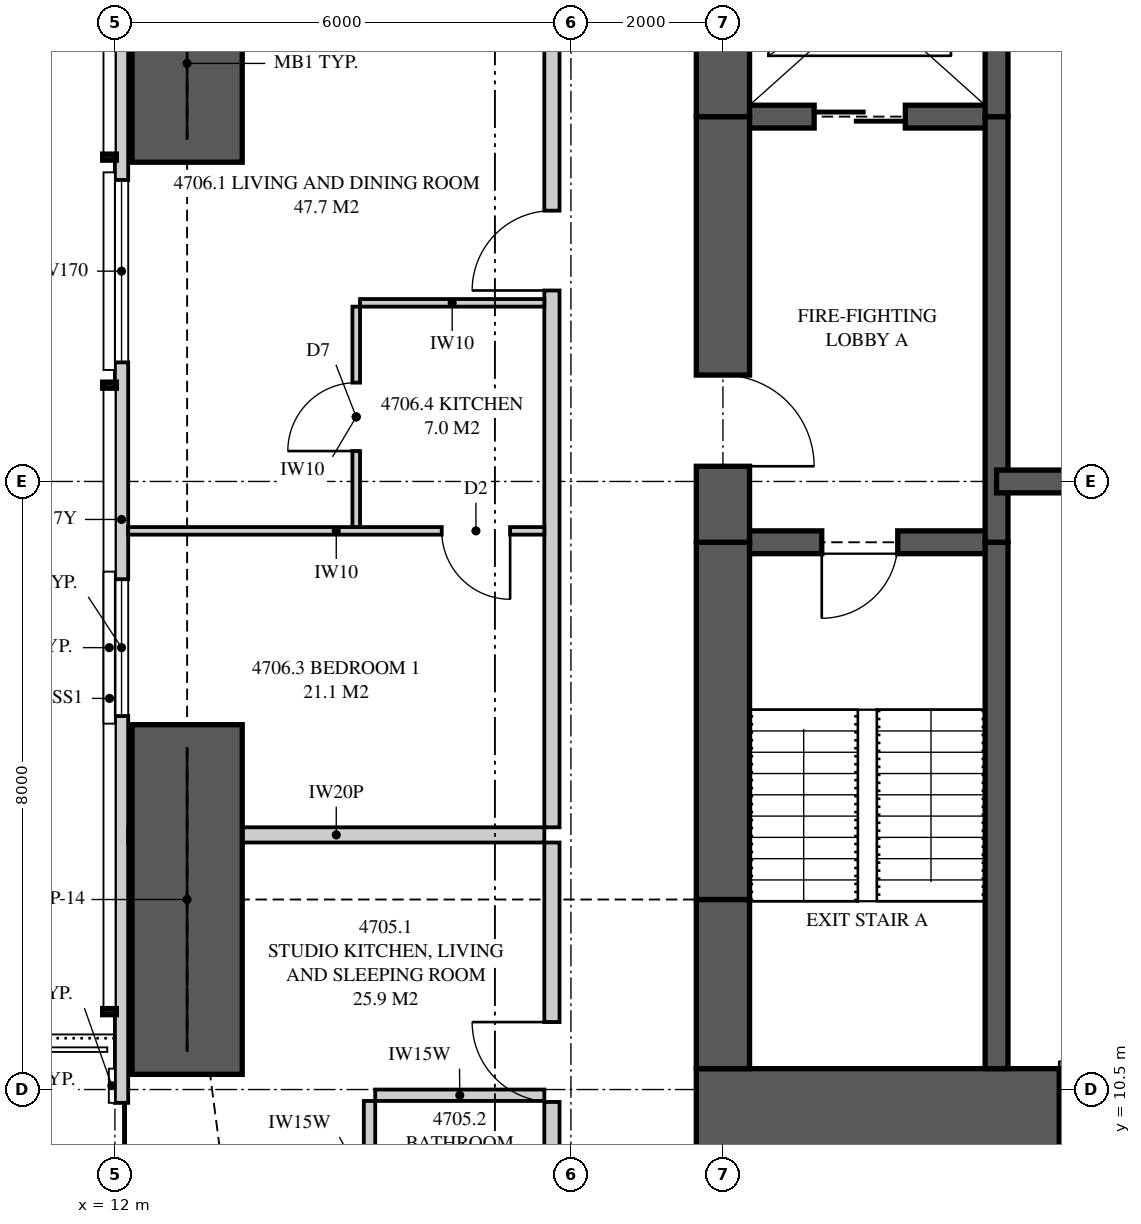
"""IFC4 building model, lengths in metres.
Left out: names, types, materials, properties, quantities, classifications, styles, units other than length and angle.
Written with IfcOpenShell. Run it as: python <this file> out.ifc"""

import sys

from ifc_helpers import new_model, si_unit, direction, frame, frame_2d, origin, place, context, subcontext, project, spatial, polyline, rectangle, outline, extrude, element, fill, save


model = new_model("IFC4")
c1 = context("Model", 3, precision=1e-05, world=origin(), true_north=direction((0.0, 1.0)))
c2 = subcontext(c1, "Body", "Model", "MODEL_VIEW")
j1 = project(units=[si_unit("LENGTHUNIT", "METRE"), si_unit("PLANEANGLEUNIT", "RADIAN")], contexts=[c1])
p1 = place(None, origin())
s1 = spatial("IfcSite", under=j1, at=p1, CompositionType="ELEMENT")
p2 = place(p1, origin())
s2 = spatial("IfcBuilding", under=s1, at=p2, CompositionType="ELEMENT")
p3 = place(p2, frame((0.0, 0.0, 174.45)))
s3 = spatial("IfcBuildingStorey", under=s2, at=p3, CompositionType="ELEMENT", Elevation=174.45)
p4 = place(p3, frame((19.65, 10.125, 0.0), z_axis=(0.0, 0.0, 1.0), x_axis=(1.0, 0.0, 0.0)))
e1 = element("IfcWall", 1, at=p4, inside=s3, PredefinedType="SHEAR", context=c2, shape_type="SweptSolid", body=[
    extrude(rectangle(XDim=6.35, YDim=1.3, at=frame_2d((3.175, 0.0))), origin(), (0.0, 0.0, 1.0), 3.35),
])
p5 = place(p4, frame((4.775, 0.0, 0.0)))
e2 = element("IfcOpeningElement", 2, at=p5, cuts=e1, PredefinedType="OPENING", context=c2, shape_type="SweptSolid", body=[
    extrude(rectangle(XDim=0.75, YDim=2.1, at=frame_2d((0.375, 1.05))), frame((0.0, 0.66, 0.0), z_axis=(0.0, -1.0, 0.0), x_axis=(1.0, 0.0, 0.0)), (0.0, 0.0, 1.0), 1.32),
])
p6 = place(p3, frame((20.0, 26.225, 0.0), z_axis=(0.0, 0.0, 1.0), x_axis=(0.0, -1.0, 0.0)))
e3 = element("IfcWall", 3, at=p6, inside=s3, PredefinedType="SHEAR", context=c2, shape_type="SweptSolid", body=[
    extrude(rectangle(XDim=2.925, YDim=0.7, at=frame_2d((1.462, 0.0))), origin(), (0.0, 0.0, 1.0), 3.35),
])
p7 = place(p3, frame((20.0, 23.3, 0.0), z_axis=(0.0, 0.0, 1.0), x_axis=(0.0, -1.0, 0.0)))
e4 = element("IfcWall", 4, at=p7, inside=s3, PredefinedType="SHEAR", context=c2, shape_type="SweptSolid", body=[
    extrude(rectangle(XDim=5.6, YDim=0.7, at=frame_2d((2.8, 0.0))), origin(), (0.0, 0.0, 1.0), 3.35),
])
p8 = place(p7, frame((3.4, 0.0, 0.0)))
e5 = element("IfcOpeningElement", 5, at=p8, cuts=e4, PredefinedType="OPENING", context=c2, shape_type="SweptSolid", body=[
    extrude(rectangle(XDim=1.2, YDim=2.2, at=frame_2d((0.6, 1.1))), frame((0.0, 0.36, 0.0), z_axis=(0.0, -1.0, 0.0), x_axis=(1.0, 0.0, 0.0)), (0.0, 0.0, 1.0), 0.72),
])
p9 = place(p3, frame((20.0, 17.7, 0.0), z_axis=(0.0, 0.0, 1.0), x_axis=(0.0, -1.0, 0.0)))
e6 = element("IfcWall", 6, at=p9, inside=s3, PredefinedType="SHEAR", context=c2, shape_type="SweptSolid", body=[
    extrude(rectangle(XDim=4.7, YDim=0.7, at=frame_2d((2.35, 0.0))), origin(), (0.0, 0.0, 1.0), 3.35),
])
p10 = place(p3, frame((20.0, 13.0, 0.0), z_axis=(0.0, 0.0, 1.0), x_axis=(0.0, -1.0, 0.0)))
e7 = element("IfcWall", 7, at=p10, inside=s3, PredefinedType="SHEAR", context=c2, shape_type="SweptSolid", body=[
    extrude(rectangle(XDim=2.225, YDim=0.7, at=frame_2d((1.113, 0.0))), origin(), (0.0, 0.0, 1.0), 3.35),
])
p11 = place(p3, frame((23.6, 10.775, 0.0), z_axis=(0.0, 0.0, 1.0), x_axis=(0.0, 1.0, 0.0)))
e8 = element("IfcWall", 8, at=p11, inside=s3, PredefinedType="SHEAR", context=c2, shape_type="SweptSolid", body=[
    extrude(rectangle(XDim=6.925, YDim=0.3, at=frame_2d((3.462, 0.0))), origin(), (0.0, 0.0, 1.0), 3.35),
])
p12 = place(p3, frame((23.6, 17.7, 0.0), z_axis=(0.0, 0.0, 1.0), x_axis=(0.0, 1.0, 0.0)))
e9 = element("IfcWall", 9, at=p12, inside=s3, PredefinedType="SHEAR", context=c2, shape_type="SweptSolid", body=[
    extrude(rectangle(XDim=5.6, YDim=0.3, at=frame_2d((2.8, 0.0))), origin(), (0.0, 0.0, 1.0), 3.35),
])
p13 = place(p3, frame((23.6, 23.3, 0.0), z_axis=(0.0, 0.0, 1.0), x_axis=(0.0, 1.0, 0.0)))
e10 = element("IfcWall", 10, at=p13, inside=s3, PredefinedType="SHEAR", context=c2, shape_type="SweptSolid", body=[
    extrude(rectangle(XDim=2.925, YDim=0.3, at=frame_2d((1.462, 0.0))), origin(), (0.0, 0.0, 1.0), 3.35),
])
p14 = place(p3, frame((20.0, 17.7, 0.0), z_axis=(0.0, 0.0, 1.0), x_axis=(1.0, 0.0, 0.0)))
e11 = element("IfcWall", 11, at=p14, inside=s3, PredefinedType="SHEAR", context=c2, shape_type="SweptSolid", body=[
    extrude(rectangle(XDim=3.6, YDim=0.3, at=frame_2d((1.8, 0.0))), origin(), (0.0, 0.0, 1.0), 3.35),
])
p15 = place(p14, frame((1.3, 0.0, 0.0)))
e12 = element("IfcOpeningElement", 12, at=p15, cuts=e11, PredefinedType="OPENING", context=c2, shape_type="SweptSolid", body=[
    extrude(rectangle(XDim=1.0, YDim=2.1, at=frame_2d((0.5, 1.05))), frame((0.0, 0.16, 0.0), z_axis=(0.0, -1.0, 0.0), x_axis=(1.0, 0.0, 0.0)), (0.0, 0.0, 1.0), 0.32),
])
p16 = place(p3, frame((20.0, 23.3, 0.0), z_axis=(0.0, 0.0, 1.0), x_axis=(1.0, 0.0, 0.0)))
e13 = element("IfcWall", 13, at=p16, inside=s3, PredefinedType="SHEAR", context=c2, shape_type="SweptSolid", body=[
    extrude(rectangle(XDim=3.6, YDim=0.3, at=frame_2d((1.8, 0.0))), origin(), (0.0, 0.0, 1.0), 3.35),
])
p17 = place(p16, frame((1.2, 0.0, 0.0)))
e14 = element("IfcOpeningElement", 14, at=p17, cuts=e13, PredefinedType="OPENING", context=c2, shape_type="SweptSolid", body=[
    extrude(rectangle(XDim=1.2, YDim=2.1, at=frame_2d((0.6, 1.05))), frame((0.0, 0.16, 0.0), z_axis=(0.0, -1.0, 0.0), x_axis=(1.0, 0.0, 0.0)), (0.0, 0.0, 1.0), 0.32),
])
p18 = place(p3, frame((23.6, 18.5, 0.0), z_axis=(0.0, 0.0, 1.0), x_axis=(1.0, 0.0, 0.0)))
e15 = element("IfcWall", 15, at=p18, inside=s3, PredefinedType="SHEAR", context=c2, shape_type="SweptSolid", body=[
    extrude(rectangle(XDim=2.4, YDim=0.3, at=frame_2d((1.2, 0.0))), origin(), (0.0, 0.0, 1.0), 3.35),
])
p19 = place(p3, frame((12.087, 32.949, 0.0), z_axis=(0.0, 0.0, 1.0), x_axis=(0.0, -1.0, 0.0)))
e16 = element("IfcWall", 16, at=p19, inside=s3, PredefinedType="SOLIDWALL", context=c2, shape_type="SweptSolid", body=[
    extrude(outline(polyline([(0.0, 0.0), (29.897, 0.0), (29.897, 3.11), (20.191, 3.11), (20.191, 2.15), (20.051, 2.15), (20.051, 3.11), (19.949, 3.11), (19.949, 2.15), (7.949, 2.15), (7.949, 3.11), (7.823, 3.11), (7.823, 2.15), (7.73, 2.15), (7.73, 3.11), (0.0, 3.11), (0.0, 0.0)])), frame((0.0, 0.087, 0.0), z_axis=(0.0, -1.0, 0.0), x_axis=(1.0, 0.0, 0.0)), (0.0, 0.0, 1.0), 0.175),
])
p20 = place(p19, frame((1.237, 0.0, 0.4)))
e17 = element("IfcOpeningElement", 17, at=p20, cuts=e16, PredefinedType="OPENING", context=c2, shape_type="SweptSolid", body=[
    extrude(rectangle(XDim=1.2, YDim=1.7, at=frame_2d((0.6, 0.85))), frame((0.0, 0.097, 0.0), z_axis=(0.0, -1.0, 0.0), x_axis=(1.0, 0.0, 0.0)), (0.0, 0.0, 1.0), 0.195),
])
p21 = place(p19, frame((10.482, 0.0, 0.4)))
e18 = element("IfcOpeningElement", 18, at=p21, cuts=e16, PredefinedType="OPENING", context=c2, shape_type="SweptSolid", body=[
    extrude(rectangle(XDim=2.4, YDim=1.7, at=frame_2d((1.2, 0.85))), frame((0.0, 0.097, 0.0), z_axis=(0.0, -1.0, 0.0), x_axis=(1.0, 0.0, 0.0)), (0.0, 0.0, 1.0), 0.195),
])
p22 = place(p19, frame((15.735, 0.0, 0.4)))
e19 = element("IfcOpeningElement", 19, at=p22, cuts=e16, PredefinedType="OPENING", context=c2, shape_type="SweptSolid", body=[
    extrude(rectangle(XDim=1.8, YDim=1.7, at=frame_2d((0.9, 0.85))), frame((0.0, 0.097, 0.0), z_axis=(0.0, -1.0, 0.0), x_axis=(1.0, 0.0, 0.0)), (0.0, 0.0, 1.0), 0.195),
])
p23 = place(p19, frame((22.624, 0.0, 0.0)))
e20 = element("IfcOpeningElement", 20, at=p23, cuts=e16, PredefinedType="OPENING", context=c2, shape_type="SweptSolid", body=[
    extrude(rectangle(XDim=1.8, YDim=2.1, at=frame_2d((0.9, 1.05))), frame((0.0, 0.097, 0.0), z_axis=(0.0, -1.0, 0.0), x_axis=(1.0, 0.0, 0.0)), (0.0, 0.0, 1.0), 0.195),
])
p24 = place(p19, frame((26.301, 0.0, 0.4)))
e21 = element("IfcOpeningElement", 21, at=p24, cuts=e16, PredefinedType="OPENING", context=c2, shape_type="SweptSolid", body=[
    extrude(rectangle(XDim=1.8, YDim=1.7, at=frame_2d((0.9, 0.85))), frame((0.0, 0.097, 0.0), z_axis=(0.0, -1.0, 0.0), x_axis=(1.0, 0.0, 0.0)), (0.0, 0.0, 1.0), 0.195),
])
p25 = place(p3, frame((12.175, 13.85, 0.0), z_axis=(0.0, 0.0, 1.0), x_axis=(1.0, 0.0, 0.0)))
e22 = element("IfcWall", 22, at=p25, inside=s3, PredefinedType="PARTITIONING", context=c2, shape_type="SweptSolid", body=[
    extrude(outline(polyline([(0.529, 2.15), (0.0, 2.15), (0.0, 0.0), (0.529, 0.0), (0.529, 0.835), (1.021, 0.835), (1.021, 0.0), (5.475, 0.0), (5.475, 3.11), (1.685, 3.11), (1.685, 2.15), (1.021, 2.15), (1.021, 1.315), (0.529, 1.315), (0.529, 2.15)])), frame((0.0, 0.1, 0.0), z_axis=(0.0, -1.0, 0.0), x_axis=(1.0, 0.0, 0.0)), (0.0, 0.0, 1.0), 0.2),
])
p26 = place(p3, frame((17.75, 7.925, 0.0), z_axis=(0.0, 0.0, 1.0), x_axis=(0.0, 1.0, 0.0)))
e23 = element("IfcWall", 23, at=p26, inside=s3, PredefinedType="PARTITIONING", context=c2, shape_type="SweptSolid", body=[
    extrude(outline(polyline([(0.0, 0.0), (5.825, 0.0), (5.825, 3.11), (5.412, 3.11), (5.412, 2.541), (4.738, 2.541), (4.738, 3.11), (0.0, 3.11), (0.0, 0.0)])), frame((0.0, 0.1, 0.0), z_axis=(0.0, -1.0, 0.0), x_axis=(1.0, 0.0, 0.0)), (0.0, 0.0, 1.0), 0.2),
])
p27 = place(p26, frame((2.413, 0.0, 0.0)))
e24 = element("IfcOpeningElement", 24, at=p27, cuts=e23, PredefinedType="OPENING", context=c2, shape_type="SweptSolid", body=[
    extrude(rectangle(XDim=1.05, YDim=2.2, at=frame_2d((0.525, 1.1))), frame((0.0, 0.11, 0.0), z_axis=(0.0, -1.0, 0.0), x_axis=(1.0, 0.0, 0.0)), (0.0, 0.0, 1.0), 0.22),
])
p28 = place(p3, frame((15.35, 7.925, 0.0), z_axis=(0.0, 0.0, 1.0), x_axis=(0.0, 1.0, 0.0)))
e25 = element("IfcWall", 25, at=p28, inside=s3, PredefinedType="PLUMBINGWALL", context=c2, shape_type="SweptSolid", body=[
    extrude(rectangle(XDim=2.425, YDim=0.15, at=frame_2d((1.212, 0.0))), origin(), (0.0, 0.0, 1.0), 3.11),
])
p29 = place(p28, frame((0.75, 0.0, 0.0)))
e26 = element("IfcOpeningElement", 26, at=p29, cuts=e25, PredefinedType="OPENING", context=c2, shape_type="SweptSolid", body=[
    extrude(rectangle(XDim=0.9, YDim=2.1, at=frame_2d((0.45, 1.05))), frame((0.0, 0.085, 0.0), z_axis=(0.0, -1.0, 0.0), x_axis=(1.0, 0.0, 0.0)), (0.0, 0.0, 1.0), 0.17),
])
p30 = place(p3, frame((15.425, 10.425, 0.0), z_axis=(0.0, 0.0, 1.0), x_axis=(1.0, 0.0, 0.0)))
e27 = element("IfcWall", 27, at=p30, inside=s3, PredefinedType="PLUMBINGWALL", context=c2, shape_type="SweptSolid", body=[
    extrude(rectangle(XDim=2.225, YDim=0.15, at=frame_2d((1.112, 0.0))), origin(), (0.0, 0.0, 1.0), 3.11),
])
p31 = place(p3, frame((17.75, 13.95, 0.0), z_axis=(0.0, 0.0, 1.0), x_axis=(0.0, 1.0, 0.0)))
e28 = element("IfcWall", 28, at=p31, inside=s3, PredefinedType="PARTITIONING", context=c2, shape_type="SweptSolid", body=[
    extrude(outline(polyline([(0.0, 0.0), (15.125, 0.0), (15.125, 3.11), (11.387, 3.11), (11.387, 2.541), (10.713, 2.541), (10.713, 3.11), (0.0, 3.11), (0.0, 0.0)])), frame((0.0, 0.1, 0.0), z_axis=(0.0, -1.0, 0.0), x_axis=(1.0, 0.0, 0.0)), (0.0, 0.0, 1.0), 0.2),
])
p32 = place(p31, frame((7.062, 0.0, 0.0)))
e29 = element("IfcOpeningElement", 29, at=p32, cuts=e28, PredefinedType="OPENING", context=c2, shape_type="SweptSolid", body=[
    extrude(rectangle(XDim=1.05, YDim=2.2, at=frame_2d((0.525, 1.1))), frame((0.0, 0.11, 0.0), z_axis=(0.0, -1.0, 0.0), x_axis=(1.0, 0.0, 0.0)), (0.0, 0.0, 1.0), 0.22),
])
p33 = place(p3, frame((12.175, 17.85, 0.0), z_axis=(0.0, 0.0, 1.0), x_axis=(1.0, 0.0, 0.0)))
e30 = element("IfcWall", 30, at=p33, inside=s3, PredefinedType="PARTITIONING", context=c2, shape_type="SweptSolid", body=[
    extrude(outline(polyline([(0.0, 0.0), (5.475, 0.0), (5.475, 3.11), (1.635, 3.11), (1.635, 2.15), (0.0, 2.15), (0.0, 3.11), (0.0, 0.0)])), frame((0.0, 0.05, 0.0), z_axis=(0.0, -1.0, 0.0), x_axis=(1.0, 0.0, 0.0)), (0.0, 0.0, 1.0), 0.1),
])
p34 = place(p33, frame((4.125, 0.0, 0.0)))
e31 = element("IfcOpeningElement", 31, at=p34, cuts=e30, PredefinedType="OPENING", context=c2, shape_type="SweptSolid", body=[
    extrude(rectangle(XDim=0.9, YDim=2.1, at=frame_2d((0.45, 1.05))), frame((0.0, 0.06, 0.0), z_axis=(0.0, -1.0, 0.0), x_axis=(1.0, 0.0, 0.0)), (0.0, 0.0, 1.0), 0.12),
])
p35 = place(p3, frame((15.175, 17.9, 0.0), z_axis=(0.0, 0.0, 1.0), x_axis=(0.0, 1.0, 0.0)))
e32 = element("IfcWall", 32, at=p35, inside=s3, PredefinedType="PARTITIONING", context=c2, shape_type="SweptSolid", body=[
    extrude(rectangle(XDim=2.9, YDim=0.1, at=frame_2d((1.45, 0.0))), origin(), (0.0, 0.0, 1.0), 3.11),
])
p36 = place(p35, frame((1.0, 0.0, 0.0)))
e33 = element("IfcOpeningElement", 33, at=p36, cuts=e32, PredefinedType="OPENING", context=c2, shape_type="SweptSolid", body=[
    extrude(rectangle(XDim=0.9, YDim=2.1, at=frame_2d((0.45, 1.05))), frame((0.0, 0.06, 0.0), z_axis=(0.0, -1.0, 0.0), x_axis=(1.0, 0.0, 0.0)), (0.0, 0.0, 1.0), 0.12),
])
p37 = place(p3, frame((15.225, 20.85, 0.0), z_axis=(0.0, 0.0, 1.0), x_axis=(1.0, 0.0, 0.0)))
e34 = element("IfcWall", 34, at=p37, inside=s3, PredefinedType="PARTITIONING", context=c2, shape_type="SweptSolid", body=[
    extrude(rectangle(XDim=2.425, YDim=0.1, at=frame_2d((1.212, 0.0))), origin(), (0.0, 0.0, 1.0), 3.11),
])
for number, where, z_axis, x_axis in (
    (35, (12.95, 22.7, 0.0), (0.0, 0.0, 1.0), (0.0, 1.0, 0.0)),
    (36, (12.95, 10.7, 0.0), (0.0, 0.0, 1.0), (0.0, 1.0, 0.0)),
):
    element("IfcWall", number, at=place(p3, frame(where, z_axis=z_axis, x_axis=x_axis)), inside=s3, PredefinedType="SHEAR", context=c2, shape_type="SweptSolid", body=[
        extrude(rectangle(XDim=4.6, YDim=1.45, at=frame_2d((2.3, 0.0))), origin(), (0.0, 0.0, 1.0), 3.35),
    ])
p38 = place(p21, origin())
e37 = element("IfcWindow", 37, at=p38, inside=s3, PartitioningType="SINGLE_PANEL", PredefinedType="WINDOW", context=c2, shape_type="SweptSolid", body=[
    extrude(rectangle(XDim=2.4, YDim=1.7, at=frame_2d((1.2, 0.85))), frame((0.0, 0.03, 0.0), z_axis=(0.0, -1.0, 0.0), x_axis=(1.0, 0.0, 0.0)), (0.0, 0.0, 1.0), 0.06),
])
fill(e18, e37)
p39 = place(p22, origin())
e38 = element("IfcWindow", 38, at=p39, inside=s3, PartitioningType="SINGLE_PANEL", PredefinedType="WINDOW", context=c2, shape_type="SweptSolid", body=[
    extrude(rectangle(XDim=1.8, YDim=1.7, at=frame_2d((0.9, 0.85))), frame((0.0, 0.03, 0.0), z_axis=(0.0, -1.0, 0.0), x_axis=(1.0, 0.0, 0.0)), (0.0, 0.0, 1.0), 0.06),
])
fill(e19, e38)
p40 = place(p23, origin())
e39 = element("IfcDoor", 39, at=p40, inside=s3, OperationType="SLIDING_TO_LEFT", PredefinedType="DOOR", context=c2, shape_type="SweptSolid", body=[
    extrude(rectangle(XDim=1.8, YDim=2.1, at=frame_2d((0.9, 1.05))), frame((0.0, 0.025, 0.0), z_axis=(0.0, -1.0, 0.0), x_axis=(1.0, 0.0, 0.0)), (0.0, 0.0, 1.0), 0.05),
])
fill(e20, e39)
p41 = place(p27, origin())
e40 = element("IfcDoor", 40, at=p41, inside=s3, OperationType="SINGLE_SWING_RIGHT", PredefinedType="DOOR", context=c2, shape_type="SweptSolid", body=[
    extrude(rectangle(XDim=1.05, YDim=2.2, at=frame_2d((0.525, 1.1))), frame((0.0, 0.025, 0.0), z_axis=(0.0, -1.0, 0.0), x_axis=(1.0, 0.0, 0.0)), (0.0, 0.0, 1.0), 0.05),
])
fill(e24, e40)
p42 = place(p32, origin())
e41 = element("IfcDoor", 41, at=p42, inside=s3, OperationType="SINGLE_SWING_LEFT", PredefinedType="DOOR", context=c2, shape_type="SweptSolid", body=[
    extrude(rectangle(XDim=1.05, YDim=2.2, at=frame_2d((0.525, 1.1))), frame((0.0, 0.025, 0.0), z_axis=(0.0, -1.0, 0.0), x_axis=(1.0, 0.0, 0.0)), (0.0, 0.0, 1.0), 0.05),
])
fill(e29, e41)
p43 = place(p34, frame((0.9, 0.0, 0.0), z_axis=(0.0, 0.0, 1.0), x_axis=(-1.0, 0.0, 0.0)))
e42 = element("IfcDoor", 42, at=p43, inside=s3, OperationType="SINGLE_SWING_LEFT", PredefinedType="DOOR", context=c2, shape_type="SweptSolid", body=[
    extrude(rectangle(XDim=0.9, YDim=2.1, at=frame_2d((0.45, 1.05))), frame((0.0, 0.025, 0.0), z_axis=(0.0, -1.0, 0.0), x_axis=(1.0, 0.0, 0.0)), (0.0, 0.0, 1.0), 0.05),
])
fill(e31, e42)
p44 = place(p36, origin())
e43 = element("IfcDoor", 43, at=p44, inside=s3, OperationType="SINGLE_SWING_LEFT", PredefinedType="DOOR", context=c2, shape_type="SweptSolid", body=[
    extrude(rectangle(XDim=0.9, YDim=2.1, at=frame_2d((0.45, 1.05))), frame((0.0, 0.025, 0.0), z_axis=(0.0, -1.0, 0.0), x_axis=(1.0, 0.0, 0.0)), (0.0, 0.0, 1.0), 0.05),
])
fill(e33, e43)
p45 = place(p15, frame((1.0, 0.0, 0.0), z_axis=(0.0, 0.0, 1.0), x_axis=(-1.0, 0.0, 0.0)))
e44 = element("IfcDoor", 44, at=p45, inside=s3, OperationType="SINGLE_SWING_RIGHT", PredefinedType="DOOR", context=c2, shape_type="SweptSolid", body=[
    extrude(rectangle(XDim=1.0, YDim=2.1, at=frame_2d((0.5, 1.05))), frame((0.0, 0.025, 0.0), z_axis=(0.0, -1.0, 0.0), x_axis=(1.0, 0.0, 0.0)), (0.0, 0.0, 1.0), 0.05),
])
fill(e12, e44)
p46 = place(p8, origin())
e45 = element("IfcDoor", 45, at=p46, inside=s3, OperationType="SINGLE_SWING_RIGHT", PredefinedType="DOOR", context=c2, shape_type="SweptSolid", body=[
    extrude(rectangle(XDim=1.2, YDim=2.2, at=frame_2d((0.6, 1.1))), frame((0.0, 0.025, 0.0), z_axis=(0.0, -1.0, 0.0), x_axis=(1.0, 0.0, 0.0)), (0.0, 0.0, 1.0), 0.05),
])
fill(e5, e45)
p47 = place(p17, origin())
e46 = element("IfcDoor", 46, at=p47, inside=s3, OperationType="SLIDING_TO_LEFT", PredefinedType="DOOR", context=c2, shape_type="SweptSolid", body=[
    extrude(rectangle(XDim=1.2, YDim=2.1, at=frame_2d((0.6, 1.05))), frame((0.0, 0.025, 0.0), z_axis=(0.0, -1.0, 0.0), x_axis=(1.0, 0.0, 0.0)), (0.0, 0.0, 1.0), 0.05),
])
fill(e14, e46)
p48 = place(p5, origin())
e47 = element("IfcDoor", 47, at=p48, inside=s3, OperationType="SINGLE_SWING_LEFT", PredefinedType="DOOR", context=c2, shape_type="SweptSolid", body=[
    extrude(rectangle(XDim=0.75, YDim=2.1, at=frame_2d((0.375, 1.05))), frame((0.0, 0.025, 0.0), z_axis=(0.0, -1.0, 0.0), x_axis=(1.0, 0.0, 0.0)), (0.0, 0.0, 1.0), 0.05),
])
fill(e2, e47)
save(model, sys.argv[1])
